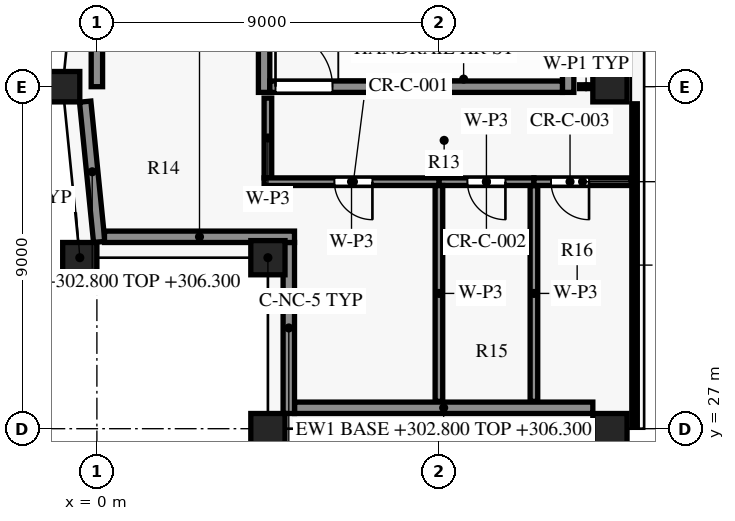
"""IFC4 building model, lengths in metres.
Left out: names, types, materials, properties, quantities, classifications, styles, units other than length and angle.
Written with IfcOpenShell. Run it as: python <this file> out.ifc"""

import sys

from ifc_helpers import new_model, si_unit, direction, frame, frame_2d, origin, origin_2d, place, context, subcontext, project, spatial, rectangle, extrude, element, fill, save


model = new_model("IFC4")
c1 = context("Model", 3, precision=1e-05, world=origin(), true_north=direction((0.0, 1.0)))
c2 = subcontext(c1, "Body", "Model", "MODEL_VIEW")
j1 = project(units=[si_unit("LENGTHUNIT", "METRE"), si_unit("PLANEANGLEUNIT", "RADIAN")], contexts=[c1])
p1 = place(None, origin())
s1 = spatial("IfcSite", under=j1, at=p1, CompositionType="ELEMENT")
p2 = place(p1, origin())
s2 = spatial("IfcBuilding", under=s1, at=p2, CompositionType="ELEMENT")
p3 = place(p2, frame((0.0, 0.0, 302.8)))
s3 = spatial("IfcBuildingStorey", under=s2, at=p3, CompositionType="ELEMENT", Elevation=302.8)
for number, where, z_axis, x_axis in (
    (1, (4.5, 27.0, 0.0), (0.0, 0.0, 1.0), (1.0, 0.0, 0.0)),
    (2, (13.5, 27.0, 0.0), (0.0, 0.0, 1.0), (1.0, 0.0, 0.0)),
    (3, (13.5, 36.0, 0.0), (0.0, 0.0, 1.0), (1.0, 0.0, 0.0)),
    (4, (-0.9, 36.0, 0.0), (0.0, 0.0, 1.0), (0.0, -1.0, 0.0)),
    (5, (-0.45, 31.5, 0.0), (0.0, 0.0, 1.0), (0.1, -0.995, 0.0)),
):
    element("IfcColumn", number, at=place(p3, frame(where, z_axis=z_axis, x_axis=x_axis)), inside=s3, PredefinedType="COLUMN", context=c2, shape_type="SweptSolid", body=[
        extrude(rectangle(XDim=0.9, YDim=0.8, at=origin_2d()), origin(), (0.0, 0.0, 1.0), 4.0),
    ])
p4 = place(p3, frame((4.5, 31.5, 0.0), z_axis=(0.0, 0.0, 1.0), x_axis=(1.0, 0.0, 0.0)))
e6 = element("IfcColumn", 6, at=p4, inside=s3, PredefinedType="COLUMN", context=c2, shape_type="SweptSolid", body=[
    extrude(rectangle(XDim=0.9, YDim=0.9, at=origin_2d()), origin(), (0.0, 0.0, 1.0), 4.0),
])
p5 = place(p3, frame((13.05, 27.55, 0.0), z_axis=(0.0, 0.0, 1.0), x_axis=(-1.0, 0.0, 0.0)))
e7 = element("IfcWall", 7, at=p5, inside=s3, PredefinedType="SOLIDWALL", context=c2, shape_type="SweptSolid", body=[
    extrude(rectangle(XDim=7.85, YDim=0.3, at=frame_2d((3.925, 0.0))), origin(), (0.0, 0.0, 1.0), 3.5),
])
p6 = place(p3, frame((0.061, 31.915, 0.0), z_axis=(0.0, 0.0, 1.0), x_axis=(-0.099549320092, 0.995032629048, 0.0)))
e8 = element("IfcWall", 8, at=p6, inside=s3, PredefinedType="SOLIDWALL", context=c2, shape_type="SweptSolid", body=[
    extrude(rectangle(XDim=3.71, YDim=0.3, at=frame_2d((1.855, 0.0))), origin(), (0.0, 0.0, 1.0), 3.5),
])
p7 = place(p3, frame((5.2, 32.05, 0.0), z_axis=(0.0, 0.0, 1.0), x_axis=(-1.0, 0.0, 0.0)))
e9 = element("IfcWall", 9, at=p7, inside=s3, PredefinedType="SOLIDWALL", context=c2, shape_type="SweptSolid", body=[
    extrude(rectangle(XDim=5.0, YDim=0.3, at=frame_2d((2.5, 0.0))), origin(), (0.0, 0.0, 1.0), 3.5),
])
p8 = place(p3, frame((5.05, 27.4, 0.0), z_axis=(0.0, 0.0, 1.0), x_axis=(0.0, 1.0, 0.0)))
e10 = element("IfcWall", 10, at=p8, inside=s3, PredefinedType="SOLIDWALL", context=c2, shape_type="SweptSolid", body=[
    extrude(rectangle(XDim=4.502, YDim=0.3, at=frame_2d((2.251, 0.0))), origin(), (0.0, 0.0, 1.0), 3.5),
])
p9 = place(p3, frame((4.55, 36.0, 0.0), z_axis=(0.0, 0.0, 1.0), x_axis=(1.0, 0.0, 0.0)))
e11 = element("IfcWall", 11, at=p9, inside=s3, PredefinedType="SHEAR", context=c2, shape_type="SweptSolid", body=[
    extrude(rectangle(XDim=7.7, YDim=0.3, at=frame_2d((3.85, 0.0))), origin(), (0.0, 0.0, 1.0), 3.7),
])
p10 = place(p9, frame((0.15, 0.0, 0.0)))
e12 = element("IfcOpeningElement", 12, at=p10, cuts=e11, PredefinedType="OPENING", context=c2, shape_type="SweptSolid", body=[
    extrude(rectangle(XDim=1.5, YDim=2.2, at=frame_2d((0.75, 1.1))), frame((0.0, 0.16, 0.0), z_axis=(0.0, -1.0, 0.0), x_axis=(1.0, 0.0, 0.0)), (0.0, 0.0, 1.0), 0.32),
])
p11 = place(p3, frame((0.0, 36.0, 0.0), z_axis=(0.0, 0.0, 1.0), x_axis=(0.0, 1.0, 0.0)))
e13 = element("IfcWall", 13, at=p11, inside=s3, PredefinedType="SHEAR", context=c2, shape_type="SweptSolid", body=[
    extrude(rectangle(XDim=7.275, YDim=0.3, at=frame_2d((3.637, 0.0))), origin(), (0.0, 0.0, 1.0), 3.7),
])
p12 = place(p3, frame((4.4, 35.85, 0.0), z_axis=(0.0, 0.0, 1.0), x_axis=(0.0, 1.0, 0.0)))
e14 = element("IfcWall", 14, at=p12, inside=s3, PredefinedType="SHEAR", context=c2, shape_type="SweptSolid", body=[
    extrude(rectangle(XDim=3.75, YDim=0.3, at=frame_2d((1.875, 0.0))), origin(), (0.0, 0.0, 1.0), 3.7),
])
p13 = place(p3, frame((12.4, 35.85, 0.0), z_axis=(0.0, 0.0, 1.0), x_axis=(0.0, 1.0, 0.0)))
e15 = element("IfcWall", 15, at=p13, inside=s3, PredefinedType="SHEAR", context=c2, shape_type="SweptSolid", body=[
    extrude(rectangle(XDim=3.9, YDim=0.3, at=frame_2d((1.95, 0.0))), origin(), (0.0, 0.0, 1.0), 3.7),
])
for number, where, z_axis, x_axis in (
    (16, (9.0, 33.4, 0.0), (0.0, 0.0, 1.0), (0.0, -1.0, 0.0)),
    (17, (11.5, 33.4, 0.0), (0.0, 0.0, 1.0), (0.0, -1.0, 0.0)),
):
    element("IfcWall", number, at=place(p3, frame(where, z_axis=z_axis, x_axis=x_axis)), inside=s3, PredefinedType="PARTITIONING", context=c2, shape_type="SweptSolid", body=[
        extrude(rectangle(XDim=5.68, YDim=0.2, at=frame_2d((2.84, 0.0))), origin(), (0.0, 0.0, 1.0), 3.68),
    ])
p14 = place(p3, frame((9.0, 33.5, 0.0), z_axis=(0.0, 0.0, 1.0), x_axis=(-1.0, 0.0, 0.0)))
e18 = element("IfcWall", 18, at=p14, inside=s3, PredefinedType="PARTITIONING", context=c2, shape_type="SweptSolid", body=[
    extrude(rectangle(XDim=4.6, YDim=0.2, at=frame_2d((2.3, 0.0))), origin(), (0.0, 0.0, 1.0), 3.68),
])
p15 = place(p14, frame((1.75, 0.0, 0.0)))
e19 = element("IfcOpeningElement", 19, at=p15, cuts=e18, PredefinedType="OPENING", context=c2, shape_type="SweptSolid", body=[
    extrude(rectangle(XDim=1.0, YDim=2.1, at=frame_2d((0.5, 1.05))), frame((0.0, 0.11, 0.0), z_axis=(0.0, -1.0, 0.0), x_axis=(1.0, 0.0, 0.0)), (0.0, 0.0, 1.0), 0.22),
])
p16 = place(p3, frame((11.5, 33.5, 0.0), z_axis=(0.0, 0.0, 1.0), x_axis=(-1.0, 0.0, 0.0)))
e20 = element("IfcWall", 20, at=p16, inside=s3, PredefinedType="PARTITIONING", context=c2, shape_type="SweptSolid", body=[
    extrude(rectangle(XDim=2.5, YDim=0.2, at=frame_2d((1.25, 0.0))), origin(), (0.0, 0.0, 1.0), 3.68),
])
p17 = place(p16, frame((0.75, 0.0, 0.0)))
e21 = element("IfcOpeningElement", 21, at=p17, cuts=e20, PredefinedType="OPENING", context=c2, shape_type="SweptSolid", body=[
    extrude(rectangle(XDim=1.0, YDim=2.1, at=frame_2d((0.5, 1.05))), frame((0.0, 0.11, 0.0), z_axis=(0.0, -1.0, 0.0), x_axis=(1.0, 0.0, 0.0)), (0.0, 0.0, 1.0), 0.22),
])
p18 = place(p3, frame((14.06, 33.5, 0.0), z_axis=(0.0, 0.0, 1.0), x_axis=(-1.0, 0.0, 0.0)))
e22 = element("IfcWall", 22, at=p18, inside=s3, PredefinedType="PARTITIONING", context=c2, shape_type="SweptSolid", body=[
    extrude(rectangle(XDim=2.56, YDim=0.2, at=frame_2d((1.28, 0.0))), origin(), (0.0, 0.0, 1.0), 3.33),
])
p19 = place(p18, frame((1.11, 0.0, 0.0)))
e23 = element("IfcOpeningElement", 23, at=p19, cuts=e22, PredefinedType="OPENING", context=c2, shape_type="SweptSolid", body=[
    extrude(rectangle(XDim=1.0, YDim=2.1, at=frame_2d((0.5, 1.05))), frame((0.0, 0.11, 0.0), z_axis=(0.0, -1.0, 0.0), x_axis=(1.0, 0.0, 0.0)), (0.0, 0.0, 1.0), 0.22),
])
p20 = place(p3, frame((4.5, 33.6, 0.0), z_axis=(0.0, 0.0, 1.0), x_axis=(0.0, 1.0, 0.0)))
e24 = element("IfcWall", 24, at=p20, inside=s3, PredefinedType="PARTITIONING", context=c2, shape_type="SweptSolid", body=[
    extrude(rectangle(XDim=2.1, YDim=0.2, at=frame_2d((1.05, 0.0))), origin(), (0.0, 0.0, 1.0), 3.68),
])
p21 = place(p3, frame((12.7, 36.0, 0.0), z_axis=(0.0, 0.0, 1.0), x_axis=(1.0, 0.0, 0.0)))
e25 = element("IfcWall", 25, at=p21, inside=s3, PredefinedType="PARTITIONING", context=c2, shape_type="SweptSolid", body=[
    extrude(rectangle(XDim=0.345, YDim=0.1, at=frame_2d((0.172, 0.0))), origin(), (0.0, 0.0, 1.0), 3.68),
])
p22 = place(p10, origin())
e26 = element("IfcDoor", 26, at=p22, inside=s3, OperationType="SINGLE_SWING_RIGHT", PredefinedType="DOOR", context=c2, shape_type="SweptSolid", body=[
    extrude(rectangle(XDim=1.5, YDim=2.2, at=frame_2d((0.75, 1.1))), frame((0.0, 0.025, 0.0), z_axis=(0.0, -1.0, 0.0), x_axis=(1.0, 0.0, 0.0)), (0.0, 0.0, 1.0), 0.05),
])
fill(e12, e26)
p23 = place(p15, origin())
e27 = element("IfcDoor", 27, at=p23, inside=s3, OperationType="SINGLE_SWING_RIGHT", PredefinedType="DOOR", context=c2, shape_type="SweptSolid", body=[
    extrude(rectangle(XDim=1.0, YDim=2.1, at=frame_2d((0.5, 1.05))), frame((0.0, 0.025, 0.0), z_axis=(0.0, -1.0, 0.0), x_axis=(1.0, 0.0, 0.0)), (0.0, 0.0, 1.0), 0.05),
])
fill(e19, e27)
p24 = place(p17, origin())
e28 = element("IfcDoor", 28, at=p24, inside=s3, OperationType="SINGLE_SWING_RIGHT", PredefinedType="DOOR", context=c2, shape_type="SweptSolid", body=[
    extrude(rectangle(XDim=1.0, YDim=2.1, at=frame_2d((0.5, 1.05))), frame((0.0, 0.025, 0.0), z_axis=(0.0, -1.0, 0.0), x_axis=(1.0, 0.0, 0.0)), (0.0, 0.0, 1.0), 0.05),
])
fill(e21, e28)
p25 = place(p19, origin())
e29 = element("IfcDoor", 29, at=p25, inside=s3, OperationType="SINGLE_SWING_LEFT", PredefinedType="DOOR", context=c2, shape_type="SweptSolid", body=[
    extrude(rectangle(XDim=1.0, YDim=2.1, at=frame_2d((0.5, 1.05))), frame((0.0, 0.025, 0.0), z_axis=(0.0, -1.0, 0.0), x_axis=(1.0, 0.0, 0.0)), (0.0, 0.0, 1.0), 0.05),
])
fill(e23, e29)
save(model, sys.argv[1])
